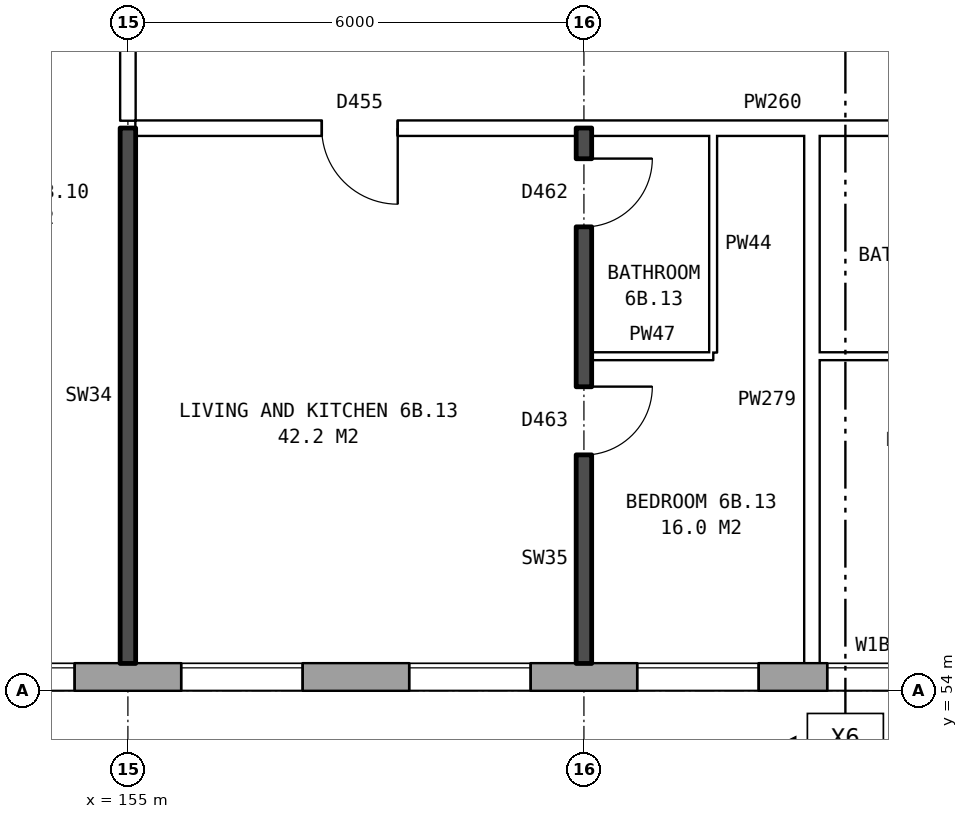
"""IFC4 building model, lengths in metres.
Left out: names, types, materials, properties, quantities, classifications, styles, units other than length and angle.
Written with IfcOpenShell. Run it as: python <this file> out.ifc"""

import sys

from ifc_helpers import new_model, si_unit, direction, frame, frame_2d, origin, place, context, subcontext, project, spatial, rectangle, extrude, element, fill, save


model = new_model("IFC4")
c1 = context("Model", 3, precision=1e-05, world=origin(), true_north=direction((0.0, 1.0)))
c2 = subcontext(c1, "Body", "Model", "MODEL_VIEW")
j1 = project(units=[si_unit("LENGTHUNIT", "METRE"), si_unit("PLANEANGLEUNIT", "RADIAN")], contexts=[c1])
p1 = place(None, origin())
s1 = spatial("IfcSite", under=j1, at=p1, CompositionType="ELEMENT")
p2 = place(p1, origin())
s2 = spatial("IfcBuilding", under=s1, at=p2, CompositionType="ELEMENT")
p3 = place(p2, frame((0.0, 0.0, 25.7)))
s3 = spatial("IfcBuildingStorey", under=s2, at=p3, CompositionType="ELEMENT", Elevation=25.7)
p4 = place(p3, frame((134.075, 54.18, 0.0), z_axis=(0.0, 0.0, 1.0), x_axis=(1.0, 0.0, 0.0)))
e1 = element("IfcWall", 1, at=p4, inside=s3, PredefinedType="STANDARD", context=c2, shape_type="SweptSolid", body=[
    extrude(rectangle(XDim=40.601, YDim=0.36, at=frame_2d((20.3, 0.0))), origin(), (0.0, 0.0, 1.0), 2.85),
])
p5 = place(p4, frame((0.625, 0.0, 0.8)))
e2 = element("IfcOpeningElement", 2, at=p5, cuts=e1, PredefinedType="OPENING", context=c2, shape_type="SweptSolid", body=[
    extrude(rectangle(XDim=1.6, YDim=1.8, at=frame_2d((0.8, 0.9))), frame((0.0, 0.19, 0.0), z_axis=(0.0, -1.0, 0.0), x_axis=(1.0, 0.0, 0.0)), (0.0, 0.0, 1.0), 0.38),
])
p6 = place(p4, frame((3.625, 0.0, 0.8)))
e3 = element("IfcOpeningElement", 3, at=p6, cuts=e1, PredefinedType="OPENING", context=c2, shape_type="SweptSolid", body=[
    extrude(rectangle(XDim=1.6, YDim=1.8, at=frame_2d((0.8, 0.9))), frame((0.0, 0.19, 0.0), z_axis=(0.0, -1.0, 0.0), x_axis=(1.0, 0.0, 0.0)), (0.0, 0.0, 1.0), 0.38),
])
p7 = place(p4, frame((5.525, 0.0, 1.7)))
e4 = element("IfcOpeningElement", 4, at=p7, cuts=e1, PredefinedType="OPENING", context=c2, shape_type="SweptSolid", body=[
    extrude(rectangle(XDim=1.2, YDim=0.9, at=frame_2d((0.6, 0.45))), frame((0.0, 0.19, 0.0), z_axis=(0.0, -1.0, 0.0), x_axis=(1.0, 0.0, 0.0)), (0.0, 0.0, 1.0), 0.38),
])
p8 = place(p4, frame((9.625, 0.0, 0.8)))
e5 = element("IfcOpeningElement", 5, at=p8, cuts=e1, PredefinedType="OPENING", context=c2, shape_type="SweptSolid", body=[
    extrude(rectangle(XDim=1.6, YDim=1.8, at=frame_2d((0.8, 0.9))), frame((0.0, 0.19, 0.0), z_axis=(0.0, -1.0, 0.0), x_axis=(1.0, 0.0, 0.0)), (0.0, 0.0, 1.0), 0.38),
])
p9 = place(p4, frame((12.625, 0.0, 0.8)))
e6 = element("IfcOpeningElement", 6, at=p9, cuts=e1, PredefinedType="OPENING", context=c2, shape_type="SweptSolid", body=[
    extrude(rectangle(XDim=1.6, YDim=1.8, at=frame_2d((0.8, 0.9))), frame((0.0, 0.19, 0.0), z_axis=(0.0, -1.0, 0.0), x_axis=(1.0, 0.0, 0.0)), (0.0, 0.0, 1.0), 0.38),
])
p10 = place(p4, frame((15.625, 0.0, 0.8)))
e7 = element("IfcOpeningElement", 7, at=p10, cuts=e1, PredefinedType="OPENING", context=c2, shape_type="SweptSolid", body=[
    extrude(rectangle(XDim=1.6, YDim=1.8, at=frame_2d((0.8, 0.9))), frame((0.0, 0.19, 0.0), z_axis=(0.0, -1.0, 0.0), x_axis=(1.0, 0.0, 0.0)), (0.0, 0.0, 1.0), 0.38),
])
p11 = place(p4, frame((18.625, 0.0, 0.8)))
e8 = element("IfcOpeningElement", 8, at=p11, cuts=e1, PredefinedType="OPENING", context=c2, shape_type="SweptSolid", body=[
    extrude(rectangle(XDim=1.6, YDim=1.8, at=frame_2d((0.8, 0.9))), frame((0.0, 0.19, 0.0), z_axis=(0.0, -1.0, 0.0), x_axis=(1.0, 0.0, 0.0)), (0.0, 0.0, 1.0), 0.38),
])
p12 = place(p4, frame((21.625, 0.0, 0.8)))
e9 = element("IfcOpeningElement", 9, at=p12, cuts=e1, PredefinedType="OPENING", context=c2, shape_type="SweptSolid", body=[
    extrude(rectangle(XDim=1.6, YDim=1.8, at=frame_2d((0.8, 0.9))), frame((0.0, 0.19, 0.0), z_axis=(0.0, -1.0, 0.0), x_axis=(1.0, 0.0, 0.0)), (0.0, 0.0, 1.0), 0.38),
])
p13 = place(p4, frame((24.625, 0.0, 0.8)))
e10 = element("IfcOpeningElement", 10, at=p13, cuts=e1, PredefinedType="OPENING", context=c2, shape_type="SweptSolid", body=[
    extrude(rectangle(XDim=1.6, YDim=1.8, at=frame_2d((0.8, 0.9))), frame((0.0, 0.19, 0.0), z_axis=(0.0, -1.0, 0.0), x_axis=(1.0, 0.0, 0.0)), (0.0, 0.0, 1.0), 0.38),
])
p14 = place(p4, frame((27.625, 0.0, 0.8)))
e11 = element("IfcOpeningElement", 11, at=p14, cuts=e1, PredefinedType="OPENING", context=c2, shape_type="SweptSolid", body=[
    extrude(rectangle(XDim=1.6, YDim=1.8, at=frame_2d((0.8, 0.9))), frame((0.0, 0.19, 0.0), z_axis=(0.0, -1.0, 0.0), x_axis=(1.0, 0.0, 0.0)), (0.0, 0.0, 1.0), 0.38),
])
p15 = place(p4, frame((30.125, 0.0, 0.8)))
e12 = element("IfcOpeningElement", 12, at=p15, cuts=e1, PredefinedType="OPENING", context=c2, shape_type="SweptSolid", body=[
    extrude(rectangle(XDim=1.2, YDim=1.8, at=frame_2d((0.6, 0.9))), frame((0.0, 0.19, 0.0), z_axis=(0.0, -1.0, 0.0), x_axis=(1.0, 0.0, 0.0)), (0.0, 0.0, 1.0), 0.38),
])
p16 = place(p4, frame((33.825, 0.0, 1.7)))
e13 = element("IfcOpeningElement", 13, at=p16, cuts=e1, PredefinedType="OPENING", context=c2, shape_type="SweptSolid", body=[
    extrude(rectangle(XDim=1.0, YDim=0.9, at=frame_2d((0.5, 0.45))), frame((0.0, 0.19, 0.0), z_axis=(0.0, -1.0, 0.0), x_axis=(1.0, 0.0, 0.0)), (0.0, 0.0, 1.0), 0.38),
])
p17 = place(p4, frame((36.625, 0.0, 0.8)))
e14 = element("IfcOpeningElement", 14, at=p17, cuts=e1, PredefinedType="OPENING", context=c2, shape_type="SweptSolid", body=[
    extrude(rectangle(XDim=1.6, YDim=1.8, at=frame_2d((0.8, 0.9))), frame((0.0, 0.19, 0.0), z_axis=(0.0, -1.0, 0.0), x_axis=(1.0, 0.0, 0.0)), (0.0, 0.0, 1.0), 0.38),
])
p18 = place(p4, frame((8.025, 0.0, 0.8)))
e15 = element("IfcOpeningElement", 15, at=p18, cuts=e1, PredefinedType="OPENING", context=c2, shape_type="SweptSolid", body=[
    extrude(rectangle(XDim=0.6, YDim=0.9, at=frame_2d((0.3, 0.45))), frame((0.0, 0.19, 0.0), z_axis=(0.0, -1.0, 0.0), x_axis=(1.0, 0.0, 0.0)), (0.0, 0.0, 1.0), 0.38),
])
p19 = place(p4, frame((31.625, 0.0, 0.8)))
e16 = element("IfcOpeningElement", 16, at=p19, cuts=e1, PredefinedType="OPENING", context=c2, shape_type="SweptSolid", body=[
    extrude(rectangle(XDim=0.6, YDim=1.2, at=frame_2d((0.3, 0.6))), frame((0.0, 0.19, 0.0), z_axis=(0.0, -1.0, 0.0), x_axis=(1.0, 0.0, 0.0)), (0.0, 0.0, 1.0), 0.38),
])
p20 = place(p4, frame((35.125, 0.0, 0.8)))
e17 = element("IfcOpeningElement", 17, at=p20, cuts=e1, PredefinedType="OPENING", context=c2, shape_type="SweptSolid", body=[
    extrude(rectangle(XDim=1.2, YDim=1.8, at=frame_2d((0.6, 0.9))), frame((0.0, 0.19, 0.0), z_axis=(0.0, -1.0, 0.0), x_axis=(1.0, 0.0, 0.0)), (0.0, 0.0, 1.0), 0.38),
])
p21 = place(p3, frame((161.1, 58.4, 0.0), z_axis=(0.0, 0.0, 1.0), x_axis=(1.0, 0.0, 0.0)))
e18 = element("IfcWall", 18, at=p21, inside=s3, PredefinedType="PARTITIONING", context=c2, shape_type="SweptSolid", body=[
    extrude(rectangle(XDim=1.6, YDim=0.1, at=frame_2d((0.8, 0.0))), origin(), (0.0, 0.0, 1.0), 2.85),
])
p22 = place(p3, frame((164.1, 58.4, 0.0), z_axis=(0.0, 0.0, 1.0), x_axis=(1.0, 0.0, 0.0)))
e19 = element("IfcWall", 19, at=p22, inside=s3, PredefinedType="PARTITIONING", context=c2, shape_type="SweptSolid", body=[
    extrude(rectangle(XDim=2.8, YDim=0.1, at=frame_2d((1.4, 0.0))), origin(), (0.0, 0.0, 1.0), 2.85),
])
p23 = place(p3, frame((155.1, 61.4, 0.0), z_axis=(0.0, 0.0, 1.0), x_axis=(1.0, 0.0, 0.0)))
e20 = element("IfcWall", 20, at=p23, inside=s3, PredefinedType="PARTITIONING", context=c2, shape_type="SweptSolid", body=[
    extrude(rectangle(XDim=22.29, YDim=0.2, at=frame_2d((11.145, 0.0))), origin(), (0.0, 0.0, 1.0), 2.85),
])
p24 = place(p23, frame((2.45, 0.0, 0.0)))
e21 = element("IfcOpeningElement", 21, at=p24, cuts=e20, PredefinedType="OPENING", context=c2, shape_type="SweptSolid", body=[
    extrude(rectangle(XDim=1.0, YDim=2.1, at=frame_2d((0.5, 1.05))), frame((0.0, 0.11, 0.0), z_axis=(0.0, -1.0, 0.0), x_axis=(1.0, 0.0, 0.0)), (0.0, 0.0, 1.0), 0.22),
])
p25 = place(p23, frame((14.4, 0.0, 0.0)))
e22 = element("IfcOpeningElement", 22, at=p25, cuts=e20, PredefinedType="OPENING", context=c2, shape_type="SweptSolid", body=[
    extrude(rectangle(XDim=1.0, YDim=2.1, at=frame_2d((0.5, 1.05))), frame((0.0, 0.11, 0.0), z_axis=(0.0, -1.0, 0.0), x_axis=(1.0, 0.0, 0.0)), (0.0, 0.0, 1.0), 0.22),
])
p26 = place(p3, frame((155.0, 54.36, 0.0), z_axis=(0.0, 0.0, 1.0), x_axis=(0.0, 1.0, 0.0)))
e23 = element("IfcWall", 23, at=p26, inside=s3, PredefinedType="SOLIDWALL", context=c2, shape_type="SweptSolid", body=[
    extrude(rectangle(XDim=7.04, YDim=0.2, at=frame_2d((3.52, 0.0))), origin(), (0.0, 0.0, 1.0), 2.85),
])
p27 = place(p3, frame((155.0, 61.5, 0.0), z_axis=(0.0, 0.0, 1.0), x_axis=(0.0, 1.0, 0.0)))
e24 = element("IfcWall", 24, at=p27, inside=s3, PredefinedType="PARTITIONING", context=c2, shape_type="SweptSolid", body=[
    extrude(rectangle(XDim=2.2, YDim=0.2, at=frame_2d((1.1, 0.0))), origin(), (0.0, 0.0, 1.0), 2.85),
])
p28 = place(p3, frame((161.0, 54.36, 0.0), z_axis=(0.0, 0.0, 1.0), x_axis=(0.0, 1.0, 0.0)))
e25 = element("IfcWall", 25, at=p28, inside=s3, PredefinedType="SOLIDWALL", context=c2, shape_type="SweptSolid", body=[
    extrude(rectangle(XDim=7.04, YDim=0.2, at=frame_2d((3.52, 0.0))), origin(), (0.0, 0.0, 1.0), 2.85),
])
p29 = place(p28, frame((2.74, 0.0, 0.0)))
e26 = element("IfcOpeningElement", 26, at=p29, cuts=e25, PredefinedType="OPENING", context=c2, shape_type="SweptSolid", body=[
    extrude(rectangle(XDim=0.9, YDim=2.1, at=frame_2d((0.45, 1.05))), frame((0.0, 0.11, 0.0), z_axis=(0.0, -1.0, 0.0), x_axis=(1.0, 0.0, 0.0)), (0.0, 0.0, 1.0), 0.22),
])
p30 = place(p28, frame((5.74, 0.0, 0.0)))
e27 = element("IfcOpeningElement", 27, at=p30, cuts=e25, PredefinedType="OPENING", context=c2, shape_type="SweptSolid", body=[
    extrude(rectangle(XDim=0.9, YDim=2.1, at=frame_2d((0.45, 1.05))), frame((0.0, 0.11, 0.0), z_axis=(0.0, -1.0, 0.0), x_axis=(1.0, 0.0, 0.0)), (0.0, 0.0, 1.0), 0.22),
])
p31 = place(p3, frame((162.7, 58.45, 0.0), z_axis=(0.0, 0.0, 1.0), x_axis=(0.0, 1.0, 0.0)))
e28 = element("IfcWall", 28, at=p31, inside=s3, PredefinedType="PARTITIONING", context=c2, shape_type="SweptSolid", body=[
    extrude(rectangle(XDim=2.85, YDim=0.1, at=frame_2d((1.425, 0.0))), origin(), (0.0, 0.0, 1.0), 2.85),
])
p32 = place(p3, frame((164.0, 54.36, 0.0), z_axis=(0.0, 0.0, 1.0), x_axis=(0.0, 1.0, 0.0)))
e29 = element("IfcWall", 29, at=p32, inside=s3, PredefinedType="PARTITIONING", context=c2, shape_type="SweptSolid", body=[
    extrude(rectangle(XDim=6.94, YDim=0.2, at=frame_2d((3.47, 0.0))), origin(), (0.0, 0.0, 1.0), 2.85),
])
p33 = place(p11, origin())
e30 = element("IfcWindow", 30, at=p33, inside=s3, PartitioningType="SINGLE_PANEL", PredefinedType="WINDOW", context=c2, shape_type="SweptSolid", body=[
    extrude(rectangle(XDim=1.6, YDim=1.8, at=frame_2d((0.8, 0.9))), frame((0.0, 0.15, 0.0), z_axis=(0.0, -1.0, 0.0), x_axis=(1.0, 0.0, 0.0)), (0.0, 0.0, 1.0), 0.06),
])
fill(e8, e30)
p34 = place(p12, origin())
e31 = element("IfcWindow", 31, at=p34, inside=s3, PartitioningType="SINGLE_PANEL", PredefinedType="WINDOW", context=c2, shape_type="SweptSolid", body=[
    extrude(rectangle(XDim=1.6, YDim=1.8, at=frame_2d((0.8, 0.9))), frame((0.0, 0.15, 0.0), z_axis=(0.0, -1.0, 0.0), x_axis=(1.0, 0.0, 0.0)), (0.0, 0.0, 1.0), 0.06),
])
fill(e9, e31)
p35 = place(p13, origin())
e32 = element("IfcWindow", 32, at=p35, inside=s3, PartitioningType="SINGLE_PANEL", PredefinedType="WINDOW", context=c2, shape_type="SweptSolid", body=[
    extrude(rectangle(XDim=1.6, YDim=1.8, at=frame_2d((0.8, 0.9))), frame((0.0, 0.15, 0.0), z_axis=(0.0, -1.0, 0.0), x_axis=(1.0, 0.0, 0.0)), (0.0, 0.0, 1.0), 0.06),
])
fill(e10, e32)
p36 = place(p14, origin())
e33 = element("IfcWindow", 33, at=p36, inside=s3, PartitioningType="SINGLE_PANEL", PredefinedType="WINDOW", context=c2, shape_type="SweptSolid", body=[
    extrude(rectangle(XDim=1.6, YDim=1.8, at=frame_2d((0.8, 0.9))), frame((0.0, 0.15, 0.0), z_axis=(0.0, -1.0, 0.0), x_axis=(1.0, 0.0, 0.0)), (0.0, 0.0, 1.0), 0.06),
])
fill(e11, e33)
p37 = place(p15, origin())
e34 = element("IfcWindow", 34, at=p37, inside=s3, PartitioningType="SINGLE_PANEL", PredefinedType="WINDOW", context=c2, shape_type="SweptSolid", body=[
    extrude(rectangle(XDim=1.2, YDim=1.8, at=frame_2d((0.6, 0.9))), frame((0.0, 0.15, 0.0), z_axis=(0.0, -1.0, 0.0), x_axis=(1.0, 0.0, 0.0)), (0.0, 0.0, 1.0), 0.06),
])
fill(e12, e34)
p38 = place(p29, frame((0.9, 0.0, 0.0), z_axis=(0.0, 0.0, 1.0), x_axis=(-1.0, 0.0, 0.0)))
e35 = element("IfcDoor", 35, at=p38, inside=s3, OperationType="SINGLE_SWING_LEFT", PredefinedType="DOOR", context=c2, shape_type="SweptSolid", body=[
    extrude(rectangle(XDim=0.9, YDim=2.1, at=frame_2d((0.45, 1.05))), frame((0.0, 0.025, 0.0), z_axis=(0.0, -1.0, 0.0), x_axis=(1.0, 0.0, 0.0)), (0.0, 0.0, 1.0), 0.05),
])
fill(e26, e35)
p39 = place(p24, frame((1.0, 0.0, 0.0), z_axis=(0.0, 0.0, 1.0), x_axis=(-1.0, 0.0, 0.0)))
e36 = element("IfcDoor", 36, at=p39, inside=s3, OperationType="SINGLE_SWING_LEFT", PredefinedType="DOOR", context=c2, shape_type="SweptSolid", body=[
    extrude(rectangle(XDim=1.0, YDim=2.1, at=frame_2d((0.5, 1.05))), frame((0.0, 0.025, 0.0), z_axis=(0.0, -1.0, 0.0), x_axis=(1.0, 0.0, 0.0)), (0.0, 0.0, 1.0), 0.05),
])
fill(e21, e36)
p40 = place(p30, frame((0.9, 0.0, 0.0), z_axis=(0.0, 0.0, 1.0), x_axis=(-1.0, 0.0, 0.0)))
e37 = element("IfcDoor", 37, at=p40, inside=s3, OperationType="SINGLE_SWING_LEFT", PredefinedType="DOOR", context=c2, shape_type="SweptSolid", body=[
    extrude(rectangle(XDim=0.9, YDim=2.1, at=frame_2d((0.45, 1.05))), frame((0.0, 0.025, 0.0), z_axis=(0.0, -1.0, 0.0), x_axis=(1.0, 0.0, 0.0)), (0.0, 0.0, 1.0), 0.05),
])
fill(e27, e37)
save(model, sys.argv[1])
